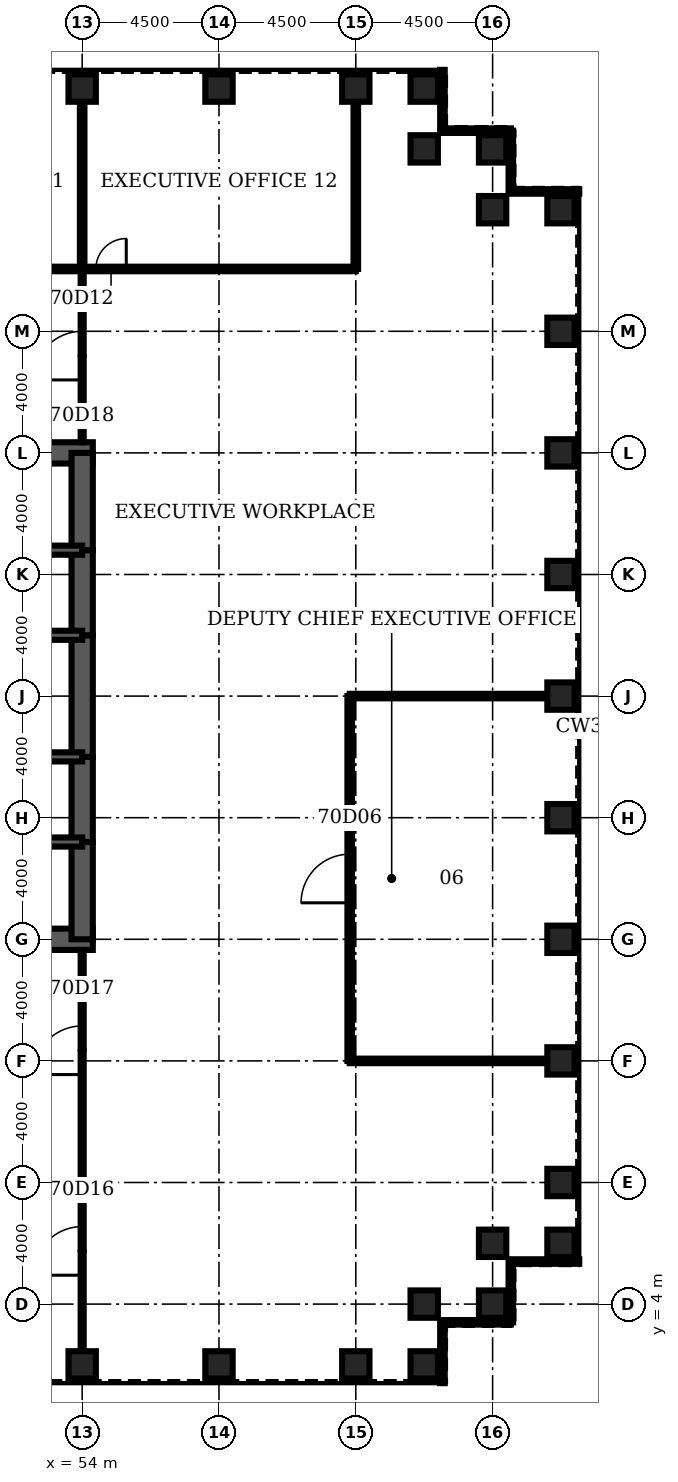
"""IFC4 building model, lengths in metres.
Left out: names, types, materials, properties, quantities, classifications, styles, units other than length and angle.
Written with IfcOpenShell. Run it as: python <this file> out.ifc"""

import sys

from ifc_helpers import new_model, si_unit, direction, frame, frame_2d, origin, origin_2d, place, context, subcontext, project, spatial, rectangle, hollow_rectangle, extrude, element, fill, save


model = new_model("IFC4")
c1 = context("Model", 3, precision=1e-05, world=origin(), true_north=direction((0.0, 1.0)))
c2 = subcontext(c1, "Body", "Model", "MODEL_VIEW")
j1 = project(units=[si_unit("LENGTHUNIT", "METRE"), si_unit("PLANEANGLEUNIT", "RADIAN")], contexts=[c1])
p1 = place(None, origin())
s1 = spatial("IfcSite", under=j1, at=p1, CompositionType="ELEMENT")
p2 = place(p1, origin())
s2 = spatial("IfcBuilding", under=s1, at=p2, CompositionType="ELEMENT")
p3 = place(p2, frame((0.0, 0.0, 308.9)))
s3 = spatial("IfcBuildingStorey", under=s2, at=p3, CompositionType="ELEMENT", Elevation=308.9)
for number, where, z_axis, x_axis in (
    (1, (54.0, 2.0, 0.0), (0.0, 0.0, 1.0), (0.0, 1.0, 0.0)),
    (2, (58.5, 2.0, 0.0), (0.0, 0.0, 1.0), (0.0, 1.0, 0.0)),
    (3, (63.0, 2.0, 0.0), (0.0, 0.0, 1.0), (0.0, 1.0, 0.0)),
    (4, (65.25, 2.0, 0.0), (0.0, 0.0, 1.0), (0.0, 1.0, 0.0)),
    (5, (65.25, 4.0, 0.0), (0.0, 0.0, 1.0), (0.0, 1.0, 0.0)),
    (6, (67.5, 4.0, 0.0), (0.0, 0.0, 1.0), (1.0, 0.0, 0.0)),
    (7, (67.5, 6.0, 0.0), (0.0, 0.0, 1.0), (1.0, 0.0, 0.0)),
    (8, (69.75, 6.0, 0.0), (0.0, 0.0, 1.0), (1.0, 0.0, 0.0)),
    (9, (69.75, 8.0, 0.0), (0.0, 0.0, 1.0), (1.0, 0.0, 0.0)),
    (10, (69.75, 12.0, 0.0), (0.0, 0.0, 1.0), (1.0, 0.0, 0.0)),
    (11, (69.75, 16.0, 0.0), (0.0, 0.0, 1.0), (1.0, 0.0, 0.0)),
    (12, (69.75, 20.0, 0.0), (0.0, 0.0, 1.0), (1.0, 0.0, 0.0)),
    (13, (69.75, 24.0, 0.0), (0.0, 0.0, 1.0), (1.0, 0.0, 0.0)),
    (14, (69.75, 28.0, 0.0), (0.0, 0.0, 1.0), (1.0, 0.0, 0.0)),
    (15, (69.75, 32.0, 0.0), (0.0, 0.0, 1.0), (1.0, 0.0, 0.0)),
    (16, (69.75, 36.0, 0.0), (0.0, 0.0, 1.0), (1.0, 0.0, 0.0)),
    (17, (69.75, 40.0, 0.0), (0.0, 0.0, 1.0), (1.0, 0.0, 0.0)),
    (18, (67.5, 40.0, 0.0), (0.0, 0.0, 1.0), (1.0, 0.0, 0.0)),
    (19, (67.5, 42.0, 0.0), (0.0, 0.0, 1.0), (1.0, 0.0, 0.0)),
    (20, (65.25, 42.0, 0.0), (0.0, 0.0, 1.0), (0.0, 1.0, 0.0)),
    (21, (65.25, 44.0, 0.0), (0.0, 0.0, 1.0), (0.0, 1.0, 0.0)),
    (22, (63.0, 44.0, 0.0), (0.0, 0.0, 1.0), (0.0, 1.0, 0.0)),
    (23, (58.5, 44.0, 0.0), (0.0, 0.0, 1.0), (0.0, 1.0, 0.0)),
    (24, (54.0, 44.0, 0.0), (0.0, 0.0, 1.0), (0.0, 1.0, 0.0)),
):
    element("IfcColumn", number, at=place(p3, frame(where, z_axis=z_axis, x_axis=x_axis)), inside=s3, PredefinedType="COLUMN", context=c2, shape_type="SweptSolid", body=[
        extrude(hollow_rectangle(XDim=0.9, YDim=0.9, WallThickness=0.06, at=origin_2d()), origin(), (0.0, 0.0, 1.0), 4.2),
    ])
for number, where, z_axis, x_axis in (
    (25, (45.0, 16.0, 0.0), (0.0, 0.0, 1.0), (1.0, 0.0, 0.0)),
    (26, (54.35, 32.0, 0.0), (0.0, 0.0, 1.0), (-1.0, 0.0, 0.0)),
):
    element("IfcWall", number, at=place(p3, frame(where, z_axis=z_axis, x_axis=x_axis)), inside=s3, PredefinedType="SHEAR", context=c2, shape_type="SweptSolid", body=[
        extrude(rectangle(XDim=9.35, YDim=0.7, at=frame_2d((4.675, 0.0))), origin(), (0.0, 0.0, 1.0), 4.2),
    ])
p4 = place(p3, frame((54.0, 16.0, 0.0), z_axis=(0.0, 0.0, 1.0), x_axis=(0.0, 1.0, 0.0)))
e27 = element("IfcWall", 27, at=p4, inside=s3, PredefinedType="SHEAR", context=c2, shape_type="SweptSolid", body=[
    extrude(rectangle(XDim=3.2, YDim=0.7, at=frame_2d((1.6, 0.0))), origin(), (0.0, 0.0, 1.0), 4.2),
])
p5 = place(p3, frame((54.0, 19.2, 0.0), z_axis=(0.0, 0.0, 1.0), x_axis=(0.0, 1.0, 0.0)))
e28 = element("IfcWall", 28, at=p5, inside=s3, PredefinedType="SHEAR", context=c2, shape_type="SweptSolid", body=[
    extrude(rectangle(XDim=2.8, YDim=0.7, at=frame_2d((1.4, 0.0))), origin(), (0.0, 0.0, 1.0), 4.2),
])
p6 = place(p5, frame((0.4, 0.0, 0.0)))
e29 = element("IfcOpeningElement", 29, at=p6, cuts=e28, PredefinedType="OPENING", context=c2, shape_type="SweptSolid", body=[
    extrude(rectangle(XDim=1.8, YDim=2.1, at=frame_2d((0.9, 1.05))), frame((0.0, 0.36, 0.0), z_axis=(0.0, -1.0, 0.0), x_axis=(1.0, 0.0, 0.0)), (0.0, 0.0, 1.0), 0.72),
])
p7 = place(p3, frame((54.0, 22.0, 0.0), z_axis=(0.0, 0.0, 1.0), x_axis=(0.0, 1.0, 0.0)))
e30 = element("IfcWall", 30, at=p7, inside=s3, PredefinedType="SHEAR", context=c2, shape_type="SweptSolid", body=[
    extrude(rectangle(XDim=4.0, YDim=0.7, at=frame_2d((2.0, 0.0))), origin(), (0.0, 0.0, 1.0), 4.2),
])
p8 = place(p3, frame((54.0, 26.0, 0.0), z_axis=(0.0, 0.0, 1.0), x_axis=(0.0, 1.0, 0.0)))
e31 = element("IfcWall", 31, at=p8, inside=s3, PredefinedType="SHEAR", context=c2, shape_type="SweptSolid", body=[
    extrude(rectangle(XDim=2.8, YDim=0.7, at=frame_2d((1.4, 0.0))), origin(), (0.0, 0.0, 1.0), 4.2),
])
p9 = place(p8, frame((0.6, 0.0, 0.0)))
e32 = element("IfcOpeningElement", 32, at=p9, cuts=e31, PredefinedType="OPENING", context=c2, shape_type="SweptSolid", body=[
    extrude(rectangle(XDim=1.8, YDim=2.1, at=frame_2d((0.9, 1.05))), frame((0.0, 0.36, 0.0), z_axis=(0.0, -1.0, 0.0), x_axis=(1.0, 0.0, 0.0)), (0.0, 0.0, 1.0), 0.72),
])
p10 = place(p3, frame((54.0, 28.8, 0.0), z_axis=(0.0, 0.0, 1.0), x_axis=(0.0, 1.0, 0.0)))
e33 = element("IfcWall", 33, at=p10, inside=s3, PredefinedType="SHEAR", context=c2, shape_type="SweptSolid", body=[
    extrude(rectangle(XDim=3.2, YDim=0.7, at=frame_2d((1.6, 0.0))), origin(), (0.0, 0.0, 1.0), 4.2),
])
p11 = place(p3, frame((45.0, 19.2, 0.0), z_axis=(0.0, 0.0, 1.0), x_axis=(1.0, 0.0, 0.0)))
e34 = element("IfcWall", 34, at=p11, inside=s3, PredefinedType="SOLIDWALL", context=c2, shape_type="SweptSolid", body=[
    extrude(rectangle(XDim=9.0, YDim=0.3, at=frame_2d((4.5, 0.0))), origin(), (0.0, 0.0, 1.0), 4.2),
])
p12 = place(p11, frame((7.35, 0.0, 0.0)))
e35 = element("IfcOpeningElement", 35, at=p12, cuts=e34, PredefinedType="OPENING", context=c2, shape_type="SweptSolid", body=[
    extrude(rectangle(XDim=1.0, YDim=2.1, at=frame_2d((0.5, 1.05))), frame((0.0, 0.16, 0.0), z_axis=(0.0, -1.0, 0.0), x_axis=(1.0, 0.0, 0.0)), (0.0, 0.0, 1.0), 0.32),
])
p13 = place(p3, frame((45.0, 28.8, 0.0), z_axis=(0.0, 0.0, 1.0), x_axis=(1.0, 0.0, 0.0)))
e36 = element("IfcWall", 36, at=p13, inside=s3, PredefinedType="SOLIDWALL", context=c2, shape_type="SweptSolid", body=[
    extrude(rectangle(XDim=9.0, YDim=0.3, at=frame_2d((4.5, 0.0))), origin(), (0.0, 0.0, 1.0), 4.2),
])
p14 = place(p13, frame((7.35, 0.0, 0.0)))
e37 = element("IfcOpeningElement", 37, at=p14, cuts=e36, PredefinedType="OPENING", context=c2, shape_type="SweptSolid", body=[
    extrude(rectangle(XDim=1.0, YDim=2.1, at=frame_2d((0.5, 1.05))), frame((0.0, 0.16, 0.0), z_axis=(0.0, -1.0, 0.0), x_axis=(1.0, 0.0, 0.0)), (0.0, 0.0, 1.0), 0.32),
])
p15 = place(p3, frame((48.0, 22.0, 0.0), z_axis=(0.0, 0.0, 1.0), x_axis=(1.0, 0.0, 0.0)))
e38 = element("IfcWall", 38, at=p15, inside=s3, PredefinedType="SOLIDWALL", context=c2, shape_type="SweptSolid", body=[
    extrude(rectangle(XDim=6.0, YDim=0.3, at=frame_2d((3.0, 0.0))), origin(), (0.0, 0.0, 1.0), 4.2),
])
p16 = place(p15, frame((2.0, 0.0, 0.0)))
e39 = element("IfcOpeningElement", 39, at=p16, cuts=e38, PredefinedType="OPENING", context=c2, shape_type="SweptSolid", body=[
    extrude(rectangle(XDim=1.0, YDim=2.1, at=frame_2d((0.5, 1.05))), frame((0.0, 0.16, 0.0), z_axis=(0.0, -1.0, 0.0), x_axis=(1.0, 0.0, 0.0)), (0.0, 0.0, 1.0), 0.32),
])
p17 = place(p3, frame((48.0, 26.0, 0.0), z_axis=(0.0, 0.0, 1.0), x_axis=(1.0, 0.0, 0.0)))
e40 = element("IfcWall", 40, at=p17, inside=s3, PredefinedType="SOLIDWALL", context=c2, shape_type="SweptSolid", body=[
    extrude(rectangle(XDim=6.0, YDim=0.3, at=frame_2d((3.0, 0.0))), origin(), (0.0, 0.0, 1.0), 4.2),
])
for number, where, z_axis, x_axis in (
    (41, (62.8, 12.0, 0.0), (0.0, 0.0, 1.0), (1.0, 0.0, 0.0)),
    (42, (62.8, 24.0, 0.0), (0.0, 0.0, 1.0), (1.0, 0.0, 0.0)),
):
    element("IfcWall", number, at=place(p3, frame(where, z_axis=z_axis, x_axis=x_axis)), inside=s3, PredefinedType="PARTITIONING", context=c2, shape_type="SweptSolid", body=[
        extrude(rectangle(XDim=6.5, YDim=0.15, at=frame_2d((3.25, 0.0))), origin(), (0.0, 0.0, 1.0), 3.0),
    ])
p18 = place(p3, frame((36.0, 38.05, 0.0), z_axis=(0.0, 0.0, 1.0), x_axis=(1.0, 0.0, 0.0)))
e43 = element("IfcWall", 43, at=p18, inside=s3, PredefinedType="PARTITIONING", context=c2, shape_type="SweptSolid", body=[
    extrude(rectangle(XDim=27.0, YDim=0.15, at=frame_2d((13.5, 0.0))), origin(), (0.0, 0.0, 1.0), 3.0),
])
p19 = place(p18, frame((0.45, 0.0, 0.0)))
e44 = element("IfcOpeningElement", 44, at=p19, cuts=e43, PredefinedType="OPENING", context=c2, shape_type="SweptSolid", body=[
    extrude(rectangle(XDim=1.0, YDim=2.1, at=frame_2d((0.5, 1.05))), frame((0.0, 0.085, 0.0), z_axis=(0.0, -1.0, 0.0), x_axis=(1.0, 0.0, 0.0)), (0.0, 0.0, 1.0), 0.17),
])
p20 = place(p18, frame((9.45, 0.0, 0.0)))
e45 = element("IfcOpeningElement", 45, at=p20, cuts=e43, PredefinedType="OPENING", context=c2, shape_type="SweptSolid", body=[
    extrude(rectangle(XDim=1.0, YDim=2.1, at=frame_2d((0.5, 1.05))), frame((0.0, 0.085, 0.0), z_axis=(0.0, -1.0, 0.0), x_axis=(1.0, 0.0, 0.0)), (0.0, 0.0, 1.0), 0.17),
])
p21 = place(p18, frame((18.45, 0.0, 0.0)))
e46 = element("IfcOpeningElement", 46, at=p21, cuts=e43, PredefinedType="OPENING", context=c2, shape_type="SweptSolid", body=[
    extrude(rectangle(XDim=1.0, YDim=2.1, at=frame_2d((0.5, 1.05))), frame((0.0, 0.085, 0.0), z_axis=(0.0, -1.0, 0.0), x_axis=(1.0, 0.0, 0.0)), (0.0, 0.0, 1.0), 0.17),
])
p22 = place(p3, frame((54.0, 2.45, 0.0), z_axis=(0.0, 0.0, 1.0), x_axis=(0.0, 1.0, 0.0)))
e47 = element("IfcWall", 47, at=p22, inside=s3, PredefinedType="PARTITIONING", context=c2, shape_type="SweptSolid", body=[
    extrude(rectangle(XDim=13.2, YDim=0.1, at=frame_2d((6.6, 0.0))), origin(), (0.0, 0.0, 1.0), 3.0),
])
p23 = place(p22, frame((2.5, 0.0, 0.0)))
e48 = element("IfcOpeningElement", 48, at=p23, cuts=e47, PredefinedType="OPENING", context=c2, shape_type="SweptSolid", body=[
    extrude(rectangle(XDim=1.6, YDim=2.1, at=frame_2d((0.8, 1.05))), frame((0.0, 0.06, 0.0), z_axis=(0.0, -1.0, 0.0), x_axis=(1.0, 0.0, 0.0)), (0.0, 0.0, 1.0), 0.12),
])
p24 = place(p22, frame((9.1, 0.0, 0.0)))
e49 = element("IfcOpeningElement", 49, at=p24, cuts=e47, PredefinedType="OPENING", context=c2, shape_type="SweptSolid", body=[
    extrude(rectangle(XDim=1.6, YDim=2.1, at=frame_2d((0.8, 1.05))), frame((0.0, 0.06, 0.0), z_axis=(0.0, -1.0, 0.0), x_axis=(1.0, 0.0, 0.0)), (0.0, 0.0, 1.0), 0.12),
])
p25 = place(p3, frame((54.0, 32.35, 0.0), z_axis=(0.0, 0.0, 1.0), x_axis=(0.0, 1.0, 0.0)))
e50 = element("IfcWall", 50, at=p25, inside=s3, PredefinedType="PARTITIONING", context=c2, shape_type="SweptSolid", body=[
    extrude(rectangle(XDim=5.7, YDim=0.1, at=frame_2d((2.85, 0.0))), origin(), (0.0, 0.0, 1.0), 3.0),
])
p26 = place(p25, frame((2.05, 0.0, 0.0)))
e51 = element("IfcOpeningElement", 51, at=p26, cuts=e50, PredefinedType="OPENING", context=c2, shape_type="SweptSolid", body=[
    extrude(rectangle(XDim=1.6, YDim=2.1, at=frame_2d((0.8, 1.05))), frame((0.0, 0.06, 0.0), z_axis=(0.0, -1.0, 0.0), x_axis=(1.0, 0.0, 0.0)), (0.0, 0.0, 1.0), 0.12),
])
p27 = place(p3, frame((54.0, 38.05, 0.0), z_axis=(0.0, 0.0, 1.0), x_axis=(0.0, 1.0, 0.0)))
e52 = element("IfcWall", 52, at=p27, inside=s3, PredefinedType="PARTITIONING", context=c2, shape_type="SweptSolid", body=[
    extrude(rectangle(XDim=5.5, YDim=0.15, at=frame_2d((2.75, 0.0))), origin(), (0.0, 0.0, 1.0), 3.0),
])
p28 = place(p3, frame((62.8, 12.0, 0.0), z_axis=(0.0, 0.0, 1.0), x_axis=(0.0, 1.0, 0.0)))
e53 = element("IfcWall", 53, at=p28, inside=s3, PredefinedType="PARTITIONING", context=c2, shape_type="SweptSolid", body=[
    extrude(rectangle(XDim=12.0, YDim=0.15, at=frame_2d((6.0, 0.0))), origin(), (0.0, 0.0, 1.0), 3.0),
])
p29 = place(p28, frame((5.2, 0.0, 0.0)))
e54 = element("IfcOpeningElement", 54, at=p29, cuts=e53, PredefinedType="OPENING", context=c2, shape_type="SweptSolid", body=[
    extrude(rectangle(XDim=1.6, YDim=2.1, at=frame_2d((0.8, 1.05))), frame((0.0, 0.085, 0.0), z_axis=(0.0, -1.0, 0.0), x_axis=(1.0, 0.0, 0.0)), (0.0, 0.0, 1.0), 0.17),
])
p30 = place(p3, frame((63.0, 38.05, 0.0), z_axis=(0.0, 0.0, 1.0), x_axis=(0.0, 1.0, 0.0)))
e55 = element("IfcWall", 55, at=p30, inside=s3, PredefinedType="PARTITIONING", context=c2, shape_type="SweptSolid", body=[
    extrude(rectangle(XDim=5.5, YDim=0.15, at=frame_2d((2.75, 0.0))), origin(), (0.0, 0.0, 1.0), 3.0),
])
p31 = place(p3, frame((65.85, 1.4, 0.0), z_axis=(0.0, 0.0, 1.0), x_axis=(0.0, 1.0, 0.0)))
e56 = element("IfcWall", 56, at=p31, inside=s3, PredefinedType="ELEMENTEDWALL", context=c2, shape_type="SweptSolid", body=[
    extrude(rectangle(XDim=2.0, YDim=0.15, at=frame_2d((1.0, 0.0))), origin(), (0.0, 0.0, 1.0), 4.04),
])
p32 = place(p3, frame((65.85, 3.4, 0.0), z_axis=(0.0, 0.0, 1.0), x_axis=(1.0, 0.0, 0.0)))
e57 = element("IfcWall", 57, at=p32, inside=s3, PredefinedType="ELEMENTEDWALL", context=c2, shape_type="SweptSolid", body=[
    extrude(rectangle(XDim=2.25, YDim=0.15, at=frame_2d((1.125, 0.0))), origin(), (0.0, 0.0, 1.0), 4.04),
])
p33 = place(p3, frame((68.1, 3.4, 0.0), z_axis=(0.0, 0.0, 1.0), x_axis=(0.0, 1.0, 0.0)))
e58 = element("IfcWall", 58, at=p33, inside=s3, PredefinedType="ELEMENTEDWALL", context=c2, shape_type="SweptSolid", body=[
    extrude(rectangle(XDim=2.0, YDim=0.15, at=frame_2d((1.0, 0.0))), origin(), (0.0, 0.0, 1.0), 4.04),
])
for number, where, z_axis, x_axis in (
    (59, (68.1, 5.4, 0.0), (0.0, 0.0, 1.0), (1.0, 0.0, 0.0)),
    (60, (70.35, 40.6, 0.0), (0.0, 0.0, 1.0), (-1.0, 0.0, 0.0)),
):
    element("IfcWall", number, at=place(p3, frame(where, z_axis=z_axis, x_axis=x_axis)), inside=s3, PredefinedType="ELEMENTEDWALL", context=c2, shape_type="SweptSolid", body=[
        extrude(rectangle(XDim=2.25, YDim=0.15, at=frame_2d((1.125, 0.0))), origin(), (0.0, 0.0, 1.0), 4.04),
    ])
p34 = place(p3, frame((68.1, 40.6, 0.0), z_axis=(0.0, 0.0, 1.0), x_axis=(0.0, 1.0, 0.0)))
e61 = element("IfcWall", 61, at=p34, inside=s3, PredefinedType="ELEMENTEDWALL", context=c2, shape_type="SweptSolid", body=[
    extrude(rectangle(XDim=2.0, YDim=0.15, at=frame_2d((1.0, 0.0))), origin(), (0.0, 0.0, 1.0), 4.04),
])
p35 = place(p3, frame((68.1, 42.6, 0.0), z_axis=(0.0, 0.0, 1.0), x_axis=(-1.0, 0.0, 0.0)))
e62 = element("IfcWall", 62, at=p35, inside=s3, PredefinedType="ELEMENTEDWALL", context=c2, shape_type="SweptSolid", body=[
    extrude(rectangle(XDim=2.25, YDim=0.15, at=frame_2d((1.125, 0.0))), origin(), (0.0, 0.0, 1.0), 4.04),
])
p36 = place(p3, frame((65.85, 42.6, 0.0), z_axis=(0.0, 0.0, 1.0), x_axis=(0.0, 1.0, 0.0)))
e63 = element("IfcWall", 63, at=p36, inside=s3, PredefinedType="ELEMENTEDWALL", context=c2, shape_type="SweptSolid", body=[
    extrude(rectangle(XDim=2.0, YDim=0.15, at=frame_2d((1.0, 0.0))), origin(), (0.0, 0.0, 1.0), 4.04),
])
p37 = place(p29, origin())
e64 = element("IfcDoor", 64, at=p37, inside=s3, OperationType="SINGLE_SWING_LEFT", PredefinedType="DOOR", context=c2, shape_type="SweptSolid", body=[
    extrude(rectangle(XDim=1.6, YDim=2.1, at=frame_2d((0.8, 1.05))), frame((0.0, 0.025, 0.0), z_axis=(0.0, -1.0, 0.0), x_axis=(1.0, 0.0, 0.0)), (0.0, 0.0, 1.0), 0.05),
])
fill(e54, e64)
p38 = place(p21, origin())
e65 = element("IfcDoor", 65, at=p38, inside=s3, OperationType="SINGLE_SWING_RIGHT", PredefinedType="DOOR", context=c2, shape_type="SweptSolid", body=[
    extrude(rectangle(XDim=1.0, YDim=2.1, at=frame_2d((0.5, 1.05))), frame((0.0, 0.025, 0.0), z_axis=(0.0, -1.0, 0.0), x_axis=(1.0, 0.0, 0.0)), (0.0, 0.0, 1.0), 0.05),
])
fill(e46, e65)
p39 = place(p23, origin())
e66 = element("IfcDoor", 66, at=p39, inside=s3, OperationType="SINGLE_SWING_LEFT", PredefinedType="DOOR", context=c2, shape_type="SweptSolid", body=[
    extrude(rectangle(XDim=1.6, YDim=2.1, at=frame_2d((0.8, 1.05))), frame((0.0, 0.025, 0.0), z_axis=(0.0, -1.0, 0.0), x_axis=(1.0, 0.0, 0.0)), (0.0, 0.0, 1.0), 0.05),
])
fill(e48, e66)
p40 = place(p24, origin())
e67 = element("IfcDoor", 67, at=p40, inside=s3, OperationType="SINGLE_SWING_LEFT", PredefinedType="DOOR", context=c2, shape_type="SweptSolid", body=[
    extrude(rectangle(XDim=1.6, YDim=2.1, at=frame_2d((0.8, 1.05))), frame((0.0, 0.025, 0.0), z_axis=(0.0, -1.0, 0.0), x_axis=(1.0, 0.0, 0.0)), (0.0, 0.0, 1.0), 0.05),
])
fill(e49, e67)
p41 = place(p26, origin())
e68 = element("IfcDoor", 68, at=p41, inside=s3, OperationType="SINGLE_SWING_LEFT", PredefinedType="DOOR", context=c2, shape_type="SweptSolid", body=[
    extrude(rectangle(XDim=1.6, YDim=2.1, at=frame_2d((0.8, 1.05))), frame((0.0, 0.025, 0.0), z_axis=(0.0, -1.0, 0.0), x_axis=(1.0, 0.0, 0.0)), (0.0, 0.0, 1.0), 0.05),
])
fill(e51, e68)
p42 = place(p12, origin())
e69 = element("IfcDoor", 69, at=p42, inside=s3, OperationType="SINGLE_SWING_RIGHT", PredefinedType="DOOR", context=c2, shape_type="SweptSolid", body=[
    extrude(rectangle(XDim=1.0, YDim=2.1, at=frame_2d((0.5, 1.05))), frame((0.0, 0.025, 0.0), z_axis=(0.0, -1.0, 0.0), x_axis=(1.0, 0.0, 0.0)), (0.0, 0.0, 1.0), 0.05),
])
fill(e35, e69)
p43 = place(p14, origin())
e70 = element("IfcDoor", 70, at=p43, inside=s3, OperationType="SINGLE_SWING_RIGHT", PredefinedType="DOOR", context=c2, shape_type="SweptSolid", body=[
    extrude(rectangle(XDim=1.0, YDim=2.1, at=frame_2d((0.5, 1.05))), frame((0.0, 0.025, 0.0), z_axis=(0.0, -1.0, 0.0), x_axis=(1.0, 0.0, 0.0)), (0.0, 0.0, 1.0), 0.05),
])
fill(e37, e70)
p44 = place(p6, origin())
e71 = element("IfcDoor", 71, at=p44, inside=s3, OperationType="SINGLE_SWING_LEFT", PredefinedType="DOOR", context=c2, shape_type="SweptSolid", body=[
    extrude(rectangle(XDim=1.8, YDim=2.1, at=frame_2d((0.9, 1.05))), frame((0.0, 0.35, 0.0), z_axis=(0.0, -1.0, 0.0), x_axis=(1.0, 0.0, 0.0)), (0.0, 0.0, 1.0), 0.699),
])
fill(e29, e71)
p45 = place(p9, origin())
e72 = element("IfcDoor", 72, at=p45, inside=s3, OperationType="SINGLE_SWING_LEFT", PredefinedType="DOOR", context=c2, shape_type="SweptSolid", body=[
    extrude(rectangle(XDim=1.8, YDim=2.1, at=frame_2d((0.9, 1.05))), frame((0.0, 0.35, 0.0), z_axis=(0.0, -1.0, 0.0), x_axis=(1.0, 0.0, 0.0)), (0.0, 0.0, 1.0), 0.699),
])
fill(e32, e72)
save(model, sys.argv[1])
